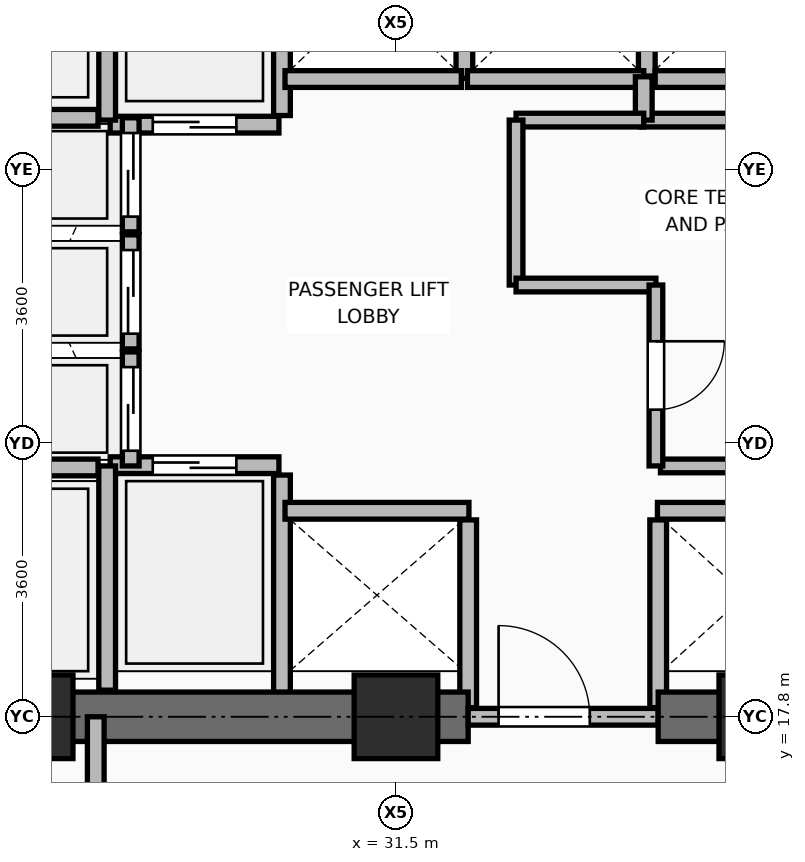
"""IFC4 building model, lengths in metres.
Left out: names, types, materials, properties, quantities, classifications, styles, units other than length and angle.
Written with IfcOpenShell. Run it as: python <this file> out.ifc"""

import sys

from ifc_helpers import new_model, si_unit, direction, frame, frame_2d, origin, origin_2d, place, context, subcontext, project, spatial, rectangle, extrude, element, fill, save


model = new_model("IFC4")
c1 = context("Model", 3, precision=1e-05, world=origin(), true_north=direction((0.0, 1.0)))
c2 = subcontext(c1, "Body", "Model", "MODEL_VIEW")
j1 = project(units=[si_unit("LENGTHUNIT", "METRE"), si_unit("PLANEANGLEUNIT", "RADIAN")], contexts=[c1])
p1 = place(None, origin())
s1 = spatial("IfcSite", under=j1, at=p1, CompositionType="ELEMENT")
p2 = place(p1, origin())
s2 = spatial("IfcBuilding", under=s1, at=p2, CompositionType="ELEMENT")
p3 = place(p2, frame((0.0, 0.0, 53.25)))
s3 = spatial("IfcBuildingStorey", under=s2, at=p3, CompositionType="ELEMENT", Elevation=53.25)
for number, where, z_axis, x_axis in (
    (1, (26.7, 17.8, 0.0), (0.0, 0.0, 1.0), (1.0, 0.0, 0.0)),
    (2, (31.5, 17.8, 0.0), (0.0, 0.0, 1.0), (1.0, 0.0, 0.0)),
    (3, (36.3, 17.8, 0.0), (0.0, 0.0, 1.0), (1.0, 0.0, 0.0)),
):
    element("IfcColumn", number, at=place(p3, frame(where, z_axis=z_axis, x_axis=x_axis)), inside=s3, PredefinedType="COLUMN", context=c2, shape_type="SweptSolid", body=[
        extrude(rectangle(XDim=1.1, YDim=1.1, at=origin_2d()), origin(), (0.0, 0.0, 1.0), 3.75),
    ])
p4 = place(p3, frame((30.0, 18.08, 0.0), z_axis=(0.0, 0.0, 1.0), x_axis=(0.0, 1.0, 0.0)))
e4 = element("IfcWall", 4, at=p4, inside=s3, PredefinedType="PARTITIONING", context=c2, shape_type="SweptSolid", body=[
    extrude(rectangle(XDim=2.9, YDim=0.22, at=frame_2d((1.45, 0.0))), origin(), (0.0, 0.0, 1.0), 3.545),
])
for number, where, z_axis, x_axis in (
    (5, (32.45, 17.92, 0.0), (0.0, 0.0, 1.0), (0.0, 1.0, 0.0)),
    (6, (34.95, 17.92, 0.0), (0.0, 0.0, 1.0), (0.0, 1.0, 0.0)),
):
    element("IfcWall", number, at=place(p3, frame(where, z_axis=z_axis, x_axis=x_axis)), inside=s3, PredefinedType="PARTITIONING", context=c2, shape_type="SweptSolid", body=[
        extrude(rectangle(XDim=2.47, YDim=0.22, at=frame_2d((1.235, 0.0))), origin(), (0.0, 0.0, 1.0), 2.928),
    ])
p5 = place(p3, frame((30.0, 25.71, 0.0), z_axis=(0.0, 0.0, 1.0), x_axis=(0.0, 1.0, 0.0)))
e7 = element("IfcWall", 7, at=p5, inside=s3, PredefinedType="PARTITIONING", context=c2, shape_type="SweptSolid", body=[
    extrude(rectangle(XDim=2.73, YDim=0.22, at=frame_2d((1.365, 0.0))), origin(), (0.0, 0.0, 1.0), 3.545),
])
p6 = place(p3, frame((32.4, 26.2, 0.0), z_axis=(0.0, 0.0, 1.0), x_axis=(0.0, 1.0, 0.0)))
e8 = element("IfcWall", 8, at=p6, inside=s3, PredefinedType="PARTITIONING", context=c2, shape_type="SweptSolid", body=[
    extrude(rectangle(XDim=2.24, YDim=0.22, at=frame_2d((1.12, 0.0))), origin(), (0.0, 0.0, 1.0), 3.545),
])
p7 = place(p3, frame((34.8, 26.23, 0.0), z_axis=(0.0, 0.0, 1.0), x_axis=(0.0, 1.0, 0.0)))
e9 = element("IfcWall", 9, at=p7, inside=s3, PredefinedType="PARTITIONING", context=c2, shape_type="SweptSolid", body=[
    extrude(rectangle(XDim=2.21, YDim=0.22, at=frame_2d((1.105, 0.0))), origin(), (0.0, 0.0, 1.0), 3.545),
])
p8 = place(p3, frame((34.91, 26.19, 0.0), z_axis=(0.0, 0.0, 1.0), x_axis=(1.0, 0.0, 0.0)))
e10 = element("IfcWall", 10, at=p8, inside=s3, PredefinedType="PARTITIONING", context=c2, shape_type="SweptSolid", body=[
    extrude(rectangle(XDim=2.14, YDim=0.22, at=frame_2d((1.07, 0.0))), origin(), (0.0, 0.0, 1.0), 3.545),
])
p9 = place(p3, frame((25.55, 17.8, 0.0), z_axis=(0.0, 0.0, 1.0), x_axis=(1.0, 0.0, 0.0)))
e11 = element("IfcWall", 11, at=p9, inside=s3, PredefinedType="SHEAR", context=c2, shape_type="SweptSolid", body=[
    extrude(rectangle(XDim=6.9, YDim=0.65, at=frame_2d((3.45, 0.0))), origin(), (0.0, 0.0, 1.0), 3.57),
])
p10 = place(p3, frame((32.45, 17.8, 0.0), z_axis=(0.0, 0.0, 1.0), x_axis=(1.0, 0.0, 0.0)))
e12 = element("IfcWall", 12, at=p10, inside=s3, PredefinedType="PARTITIONING", context=c2, shape_type="SweptSolid", body=[
    extrude(rectangle(XDim=2.5, YDim=0.22, at=frame_2d((1.25, 0.0))), origin(), (0.0, 0.0, 1.0), 2.928),
])
p11 = place(p10, frame((0.4, 0.0, 0.0)))
e13 = element("IfcOpeningElement", 13, at=p11, cuts=e12, PredefinedType="OPENING", context=c2, shape_type="SweptSolid", body=[
    extrude(rectangle(XDim=1.2, YDim=2.1, at=frame_2d((0.6, 1.05))), frame((0.0, 0.12, 0.0), z_axis=(0.0, -1.0, 0.0), x_axis=(1.0, 0.0, 0.0)), (0.0, 0.0, 1.0), 0.24),
])
p12 = place(p3, frame((34.95, 17.8, 0.0), z_axis=(0.0, 0.0, 1.0), x_axis=(1.0, 0.0, 0.0)))
e14 = element("IfcWall", 14, at=p12, inside=s3, PredefinedType="SHEAR", context=c2, shape_type="SweptSolid", body=[
    extrude(rectangle(XDim=6.475, YDim=0.65, at=frame_2d((3.238, 0.0))), origin(), (0.0, 0.0, 1.0), 3.57),
])
p13 = place(p3, frame((27.74, 21.11, 0.0), z_axis=(0.0, 0.0, 1.0), x_axis=(1.0, 0.0, 0.0)))
e15 = element("IfcWall", 15, at=p13, inside=s3, PredefinedType="PARTITIONING", context=c2, shape_type="SweptSolid", body=[
    extrude(rectangle(XDim=2.22, YDim=0.22, at=frame_2d((1.11, 0.0))), origin(), (0.0, 0.0, 1.0), 3.55),
])
p14 = place(p13, frame((0.56, 0.0, 0.0)))
e16 = element("IfcOpeningElement", 16, at=p14, cuts=e15, PredefinedType="OPENING", context=c2, shape_type="SweptSolid", body=[
    extrude(rectangle(XDim=1.1, YDim=2.2, at=frame_2d((0.55, 1.1))), frame((0.0, 0.12, 0.0), z_axis=(0.0, -1.0, 0.0), x_axis=(1.0, 0.0, 0.0)), (0.0, 0.0, 1.0), 0.24),
])
p15 = place(p3, frame((27.74, 25.59, 0.0), z_axis=(0.0, 0.0, 1.0), x_axis=(1.0, 0.0, 0.0)))
e17 = element("IfcWall", 17, at=p15, inside=s3, PredefinedType="PARTITIONING", context=c2, shape_type="SweptSolid", body=[
    extrude(rectangle(XDim=2.22, YDim=0.22, at=frame_2d((1.11, 0.0))), origin(), (0.0, 0.0, 1.0), 3.55),
])
p16 = place(p15, frame((0.56, 0.0, 0.0)))
e18 = element("IfcOpeningElement", 18, at=p16, cuts=e17, PredefinedType="OPENING", context=c2, shape_type="SweptSolid", body=[
    extrude(rectangle(XDim=1.1, YDim=2.2, at=frame_2d((0.55, 1.1))), frame((0.0, 0.12, 0.0), z_axis=(0.0, -1.0, 0.0), x_axis=(1.0, 0.0, 0.0)), (0.0, 0.0, 1.0), 0.24),
])
p17 = place(p3, frame((30.04, 20.51, 0.0), z_axis=(0.0, 0.0, 1.0), x_axis=(1.0, 0.0, 0.0)))
e19 = element("IfcWall", 19, at=p17, inside=s3, PredefinedType="PARTITIONING", context=c2, shape_type="SweptSolid", body=[
    extrude(rectangle(XDim=2.42, YDim=0.22, at=frame_2d((1.21, 0.0))), origin(), (0.0, 0.0, 1.0), 3.55),
])
p18 = place(p3, frame((34.94, 20.51, 0.0), z_axis=(0.0, 0.0, 1.0), x_axis=(1.0, 0.0, 0.0)))
e20 = element("IfcWall", 20, at=p18, inside=s3, PredefinedType="PARTITIONING", context=c2, shape_type="SweptSolid", body=[
    extrude(rectangle(XDim=2.24, YDim=0.22, at=frame_2d((1.12, 0.0))), origin(), (0.0, 0.0, 1.0), 3.55),
])
for number, where, z_axis, x_axis in (
    (21, (30.04, 26.19, 0.0), (0.0, 0.0, 1.0), (1.0, 0.0, 0.0)),
    (22, (32.44, 26.19, 0.0), (0.0, 0.0, 1.0), (1.0, 0.0, 0.0)),
):
    element("IfcWall", number, at=place(p3, frame(where, z_axis=z_axis, x_axis=x_axis)), inside=s3, PredefinedType="PARTITIONING", context=c2, shape_type="SweptSolid", body=[
        extrude(rectangle(XDim=2.32, YDim=0.22, at=frame_2d((1.16, 0.0))), origin(), (0.0, 0.0, 1.0), 3.55),
    ])
p19 = place(p3, frame((28.01, 21.1, 0.0), z_axis=(0.0, 0.0, 1.0), x_axis=(0.0, 1.0, 0.0)))
e23 = element("IfcWall", 23, at=p19, inside=s3, PredefinedType="PARTITIONING", context=c2, shape_type="SweptSolid", body=[
    extrude(rectangle(XDim=1.5, YDim=0.22, at=frame_2d((0.75, 0.0))), origin(), (0.0, 0.0, 1.0), 3.55),
])
p20 = place(p19, frame((0.2, 0.0, 0.0)))
e24 = element("IfcOpeningElement", 24, at=p20, cuts=e23, PredefinedType="OPENING", context=c2, shape_type="SweptSolid", body=[
    extrude(rectangle(XDim=1.1, YDim=2.2, at=frame_2d((0.55, 1.1))), frame((0.0, 0.12, 0.0), z_axis=(0.0, -1.0, 0.0), x_axis=(1.0, 0.0, 0.0)), (0.0, 0.0, 1.0), 0.24),
])
p21 = place(p3, frame((28.01, 22.64, 0.0), z_axis=(0.0, 0.0, 1.0), x_axis=(0.0, 1.0, 0.0)))
e25 = element("IfcWall", 25, at=p21, inside=s3, PredefinedType="PARTITIONING", context=c2, shape_type="SweptSolid", body=[
    extrude(rectangle(XDim=1.5, YDim=0.22, at=frame_2d((0.75, 0.0))), origin(), (0.0, 0.0, 1.0), 3.55),
])
p22 = place(p21, frame((0.2, 0.0, 0.0)))
e26 = element("IfcOpeningElement", 26, at=p22, cuts=e25, PredefinedType="OPENING", context=c2, shape_type="SweptSolid", body=[
    extrude(rectangle(XDim=1.1, YDim=2.2, at=frame_2d((0.55, 1.1))), frame((0.0, 0.12, 0.0), z_axis=(0.0, -1.0, 0.0), x_axis=(1.0, 0.0, 0.0)), (0.0, 0.0, 1.0), 0.24),
])
p23 = place(p3, frame((28.01, 24.18, 0.0), z_axis=(0.0, 0.0, 1.0), x_axis=(0.0, 1.0, 0.0)))
e27 = element("IfcWall", 27, at=p23, inside=s3, PredefinedType="PARTITIONING", context=c2, shape_type="SweptSolid", body=[
    extrude(rectangle(XDim=1.5, YDim=0.22, at=frame_2d((0.75, 0.0))), origin(), (0.0, 0.0, 1.0), 3.55),
])
p24 = place(p23, frame((0.2, 0.0, 0.0)))
e28 = element("IfcOpeningElement", 28, at=p24, cuts=e27, PredefinedType="OPENING", context=c2, shape_type="SweptSolid", body=[
    extrude(rectangle(XDim=1.1, YDim=2.2, at=frame_2d((0.55, 1.1))), frame((0.0, 0.12, 0.0), z_axis=(0.0, -1.0, 0.0), x_axis=(1.0, 0.0, 0.0)), (0.0, 0.0, 1.0), 0.24),
])
p25 = place(p3, frame((27.7, 18.15, 0.0), z_axis=(0.0, 0.0, 1.0), x_axis=(0.0, 1.0, 0.0)))
e29 = element("IfcWall", 29, at=p25, inside=s3, PredefinedType="PARTITIONING", context=c2, shape_type="SweptSolid", body=[
    extrude(rectangle(XDim=2.95, YDim=0.22, at=frame_2d((1.475, 0.0))), origin(), (0.0, 0.0, 1.0), 3.55),
])
p26 = place(p3, frame((27.7, 25.65, 0.0), z_axis=(0.0, 0.0, 1.0), x_axis=(0.0, 1.0, 0.0)))
e30 = element("IfcWall", 30, at=p26, inside=s3, PredefinedType="PARTITIONING", context=c2, shape_type="SweptSolid", body=[
    extrude(rectangle(XDim=3.0, YDim=0.22, at=frame_2d((1.5, 0.0))), origin(), (0.0, 0.0, 1.0), 3.55),
])
for number, where, z_axis, x_axis in (
    (31, (25.88, 21.08, 0.0), (0.0, 0.0, 1.0), (1.0, 0.0, 0.0)),
    (32, (25.88, 25.68, 0.0), (0.0, 0.0, 1.0), (1.0, 0.0, 0.0)),
):
    element("IfcWall", number, at=place(p3, frame(where, z_axis=z_axis, x_axis=x_axis)), inside=s3, PredefinedType="PARTITIONING", context=c2, shape_type="SweptSolid", body=[
        extrude(rectangle(XDim=1.7, YDim=0.22, at=frame_2d((0.85, 0.0))), origin(), (0.0, 0.0, 1.0), 3.55),
    ])
p27 = place(p3, frame((34.98, 21.1, 0.0), z_axis=(0.0, 0.0, 1.0), x_axis=(1.0, 0.0, 0.0)))
e33 = element("IfcWall", 33, at=p27, inside=s3, PredefinedType="PARTITIONING", context=c2, shape_type="SweptSolid", body=[
    extrude(rectangle(XDim=2.08, YDim=0.18, at=frame_2d((1.04, 0.0))), origin(), (0.0, 0.0, 1.0), 3.55),
])
p28 = place(p3, frame((34.72, 25.65, 0.0), z_axis=(0.0, 0.0, 1.0), x_axis=(1.0, 0.0, 0.0)))
e34 = element("IfcWall", 34, at=p28, inside=s3, PredefinedType="PARTITIONING", context=c2, shape_type="SweptSolid", body=[
    extrude(rectangle(XDim=2.34, YDim=0.18, at=frame_2d((1.17, 0.0))), origin(), (0.0, 0.0, 1.0), 3.55),
])
p29 = place(p3, frame((34.76, 25.65, 0.0), z_axis=(0.0, 0.0, 1.0), x_axis=(0.0, 1.0, 0.0)))
e35 = element("IfcWall", 35, at=p29, inside=s3, PredefinedType="PARTITIONING", context=c2, shape_type="SweptSolid", body=[
    extrude(rectangle(XDim=0.57, YDim=0.22, at=frame_2d((0.285, 0.0))), origin(), (0.0, 0.0, 1.0), 3.55),
])
p30 = place(p3, frame((33.08, 25.65, 0.0), z_axis=(0.0, 0.0, 1.0), x_axis=(1.0, 0.0, 0.0)))
e36 = element("IfcWall", 36, at=p30, inside=s3, PredefinedType="PARTITIONING", context=c2, shape_type="SweptSolid", body=[
    extrude(rectangle(XDim=1.68, YDim=0.18, at=frame_2d((0.84, 0.0))), origin(), (0.0, 0.0, 1.0), 3.55),
])
p31 = place(p3, frame((33.08, 23.48, 0.0), z_axis=(0.0, 0.0, 1.0), x_axis=(0.0, 1.0, 0.0)))
e37 = element("IfcWall", 37, at=p31, inside=s3, PredefinedType="PARTITIONING", context=c2, shape_type="SweptSolid", body=[
    extrude(rectangle(XDim=2.17, YDim=0.18, at=frame_2d((1.085, 0.0))), origin(), (0.0, 0.0, 1.0), 3.55),
])
p32 = place(p3, frame((33.08, 23.48, 0.0), z_axis=(0.0, 0.0, 1.0), x_axis=(1.0, 0.0, 0.0)))
e38 = element("IfcWall", 38, at=p32, inside=s3, PredefinedType="PARTITIONING", context=c2, shape_type="SweptSolid", body=[
    extrude(rectangle(XDim=1.84, YDim=0.18, at=frame_2d((0.92, 0.0))), origin(), (0.0, 0.0, 1.0), 3.55),
])
p33 = place(p3, frame((34.92, 21.1, 0.0), z_axis=(0.0, 0.0, 1.0), x_axis=(0.0, 1.0, 0.0)))
e39 = element("IfcWall", 39, at=p33, inside=s3, PredefinedType="PARTITIONING", context=c2, shape_type="SweptSolid", body=[
    extrude(rectangle(XDim=2.38, YDim=0.18, at=frame_2d((1.19, 0.0))), origin(), (0.0, 0.0, 1.0), 3.55),
])
p34 = place(p33, frame((0.74, 0.0, 0.0)))
e40 = element("IfcOpeningElement", 40, at=p34, cuts=e39, PredefinedType="OPENING", context=c2, shape_type="SweptSolid", body=[
    extrude(rectangle(XDim=0.9, YDim=2.1, at=frame_2d((0.45, 1.05))), frame((0.0, 0.1, 0.0), z_axis=(0.0, -1.0, 0.0), x_axis=(1.0, 0.0, 0.0)), (0.0, 0.0, 1.0), 0.2),
])
p35 = place(p3, frame((27.55, 14.35, 0.0), z_axis=(0.0, 0.0, 1.0), x_axis=(0.0, 1.0, 0.0)))
e41 = element("IfcWall", 41, at=p35, inside=s3, PredefinedType="PARTITIONING", context=c2, shape_type="SweptSolid", body=[
    extrude(rectangle(XDim=3.45, YDim=0.22, at=frame_2d((1.725, 0.0))), origin(), (0.0, 0.0, 1.0), 2.928),
])
p36 = place(p35, frame((1.175, 0.0, 0.0)))
e42 = element("IfcOpeningElement", 42, at=p36, cuts=e41, PredefinedType="OPENING", context=c2, shape_type="SweptSolid", body=[
    extrude(rectangle(XDim=1.1, YDim=2.1, at=frame_2d((0.55, 1.05))), frame((0.0, 0.12, 0.0), z_axis=(0.0, -1.0, 0.0), x_axis=(1.0, 0.0, 0.0)), (0.0, 0.0, 1.0), 0.24),
])
p37 = place(p11, origin())
e43 = element("IfcDoor", 43, at=p37, inside=s3, OperationType="SINGLE_SWING_LEFT", PredefinedType="DOOR", context=c2, shape_type="SweptSolid", body=[
    extrude(rectangle(XDim=1.2, YDim=2.1, at=frame_2d((0.6, 1.05))), frame((0.0, 0.025, 0.0), z_axis=(0.0, -1.0, 0.0), x_axis=(1.0, 0.0, 0.0)), (0.0, 0.0, 1.0), 0.05),
])
fill(e13, e43)
p38 = place(p14, origin())
e44 = element("IfcDoor", 44, at=p38, inside=s3, OperationType="DOUBLE_DOOR_SLIDING", PredefinedType="DOOR", context=c2, shape_type="SweptSolid", body=[
    extrude(rectangle(XDim=1.1, YDim=2.2, at=frame_2d((0.55, 1.1))), frame((0.0, 0.025, 0.0), z_axis=(0.0, -1.0, 0.0), x_axis=(1.0, 0.0, 0.0)), (0.0, 0.0, 1.0), 0.05),
])
fill(e16, e44)
p39 = place(p16, frame((1.1, 0.0, 0.0), z_axis=(0.0, 0.0, 1.0), x_axis=(-1.0, 0.0, 0.0)))
e45 = element("IfcDoor", 45, at=p39, inside=s3, OperationType="DOUBLE_DOOR_SLIDING", PredefinedType="DOOR", context=c2, shape_type="SweptSolid", body=[
    extrude(rectangle(XDim=1.1, YDim=2.2, at=frame_2d((0.55, 1.1))), frame((0.0, 0.025, 0.0), z_axis=(0.0, -1.0, 0.0), x_axis=(1.0, 0.0, 0.0)), (0.0, 0.0, 1.0), 0.05),
])
fill(e18, e45)
p40 = place(p20, frame((1.1, 0.0, 0.0), z_axis=(0.0, 0.0, 1.0), x_axis=(-1.0, 0.0, 0.0)))
e46 = element("IfcDoor", 46, at=p40, inside=s3, OperationType="DOUBLE_DOOR_SLIDING", PredefinedType="DOOR", context=c2, shape_type="SweptSolid", body=[
    extrude(rectangle(XDim=1.1, YDim=2.2, at=frame_2d((0.55, 1.1))), frame((0.0, 0.025, 0.0), z_axis=(0.0, -1.0, 0.0), x_axis=(1.0, 0.0, 0.0)), (0.0, 0.0, 1.0), 0.05),
])
fill(e24, e46)
p41 = place(p22, frame((1.1, 0.0, 0.0), z_axis=(0.0, 0.0, 1.0), x_axis=(-1.0, 0.0, 0.0)))
e47 = element("IfcDoor", 47, at=p41, inside=s3, OperationType="DOUBLE_DOOR_SLIDING", PredefinedType="DOOR", context=c2, shape_type="SweptSolid", body=[
    extrude(rectangle(XDim=1.1, YDim=2.2, at=frame_2d((0.55, 1.1))), frame((0.0, 0.025, 0.0), z_axis=(0.0, -1.0, 0.0), x_axis=(1.0, 0.0, 0.0)), (0.0, 0.0, 1.0), 0.05),
])
fill(e26, e47)
p42 = place(p24, frame((1.1, 0.0, 0.0), z_axis=(0.0, 0.0, 1.0), x_axis=(-1.0, 0.0, 0.0)))
e48 = element("IfcDoor", 48, at=p42, inside=s3, OperationType="DOUBLE_DOOR_SLIDING", PredefinedType="DOOR", context=c2, shape_type="SweptSolid", body=[
    extrude(rectangle(XDim=1.1, YDim=2.2, at=frame_2d((0.55, 1.1))), frame((0.0, 0.025, 0.0), z_axis=(0.0, -1.0, 0.0), x_axis=(1.0, 0.0, 0.0)), (0.0, 0.0, 1.0), 0.05),
])
fill(e28, e48)
p43 = place(p34, frame((0.9, 0.0, 0.0), z_axis=(0.0, 0.0, 1.0), x_axis=(-1.0, 0.0, 0.0)))
e49 = element("IfcDoor", 49, at=p43, inside=s3, OperationType="SINGLE_SWING_LEFT", PredefinedType="DOOR", context=c2, shape_type="SweptSolid", body=[
    extrude(rectangle(XDim=0.9, YDim=2.1, at=frame_2d((0.45, 1.05))), frame((0.0, 0.025, 0.0), z_axis=(0.0, -1.0, 0.0), x_axis=(1.0, 0.0, 0.0)), (0.0, 0.0, 1.0), 0.05),
])
fill(e40, e49)
save(model, sys.argv[1])
